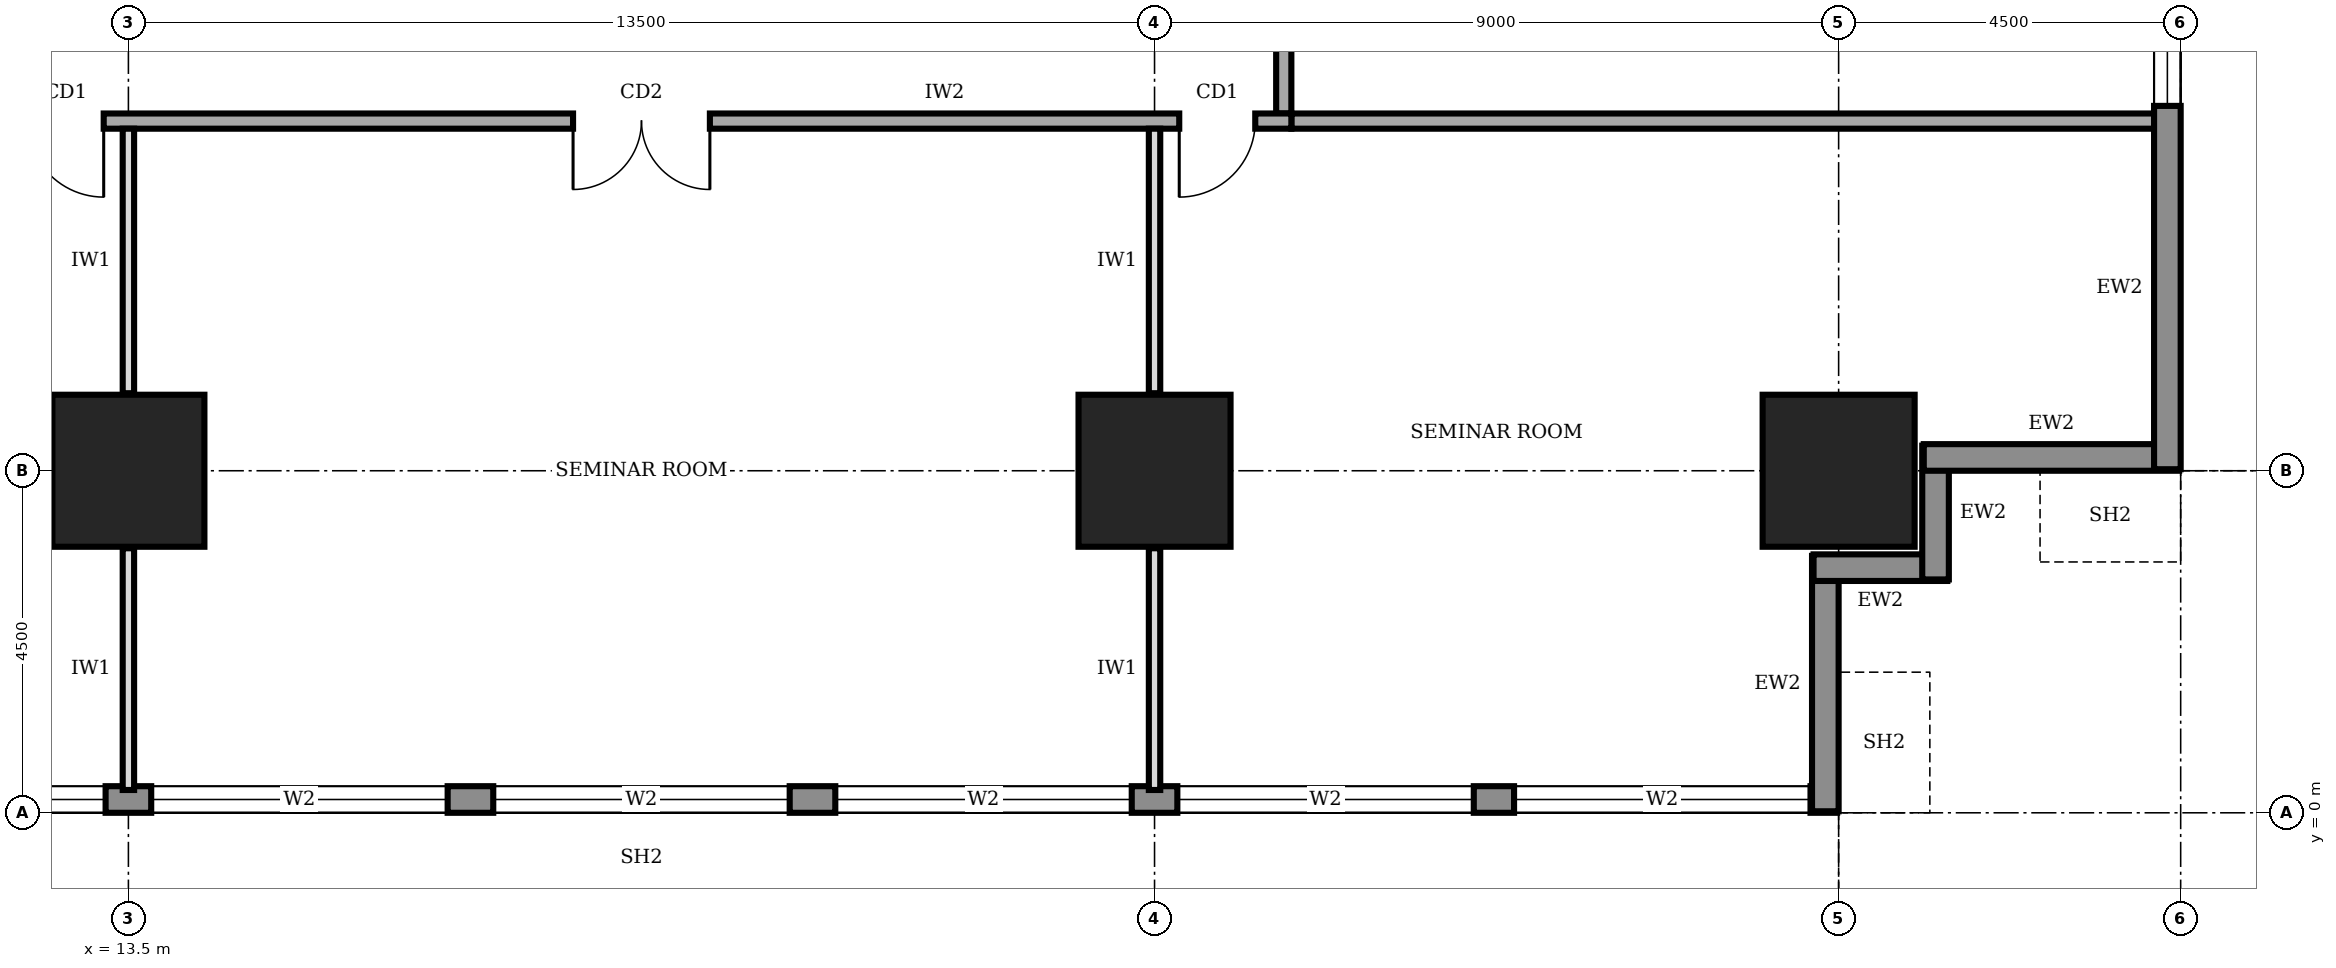
"""IFC4 building model, lengths in metres.
Left out: names, types, materials, properties, quantities, classifications, styles, units other than length and angle.
Written with IfcOpenShell. Run it as: python <this file> out.ifc"""

import sys

from ifc_helpers import new_model, si_unit, direction, frame, frame_2d, origin, origin_2d, place, context, subcontext, project, spatial, rectangle, extrude, element, fill, save


model = new_model("IFC4")
c1 = context("Model", 3, precision=1e-05, world=origin(), true_north=direction((0.0, 1.0)))
c2 = subcontext(c1, "Body", "Model", "MODEL_VIEW")
j1 = project(units=[si_unit("LENGTHUNIT", "METRE"), si_unit("PLANEANGLEUNIT", "RADIAN")], contexts=[c1])
p1 = place(None, origin())
s1 = spatial("IfcSite", under=j1, at=p1, CompositionType="ELEMENT")
p2 = place(p1, origin())
s2 = spatial("IfcBuilding", under=s1, at=p2, CompositionType="ELEMENT")
p3 = place(p2, frame((0.0, 0.0, 53.0)))
s3 = spatial("IfcBuildingStorey", under=s2, at=p3, CompositionType="ELEMENT", Elevation=53.0)
for number, where, z_axis, x_axis in (
    (1, (13.5, 4.5, 0.0), (0.0, 0.0, 1.0), (1.0, 0.0, 0.0)),
    (2, (27.0, 4.5, 0.0), (0.0, 0.0, 1.0), (1.0, 0.0, 0.0)),
    (3, (36.0, 4.5, 0.0), (0.0, 0.0, 1.0), (1.0, 0.0, 0.0)),
):
    element("IfcColumn", number, at=place(p3, frame(where, z_axis=z_axis, x_axis=x_axis)), inside=s3, PredefinedType="COLUMN", context=c2, shape_type="SweptSolid", body=[
        extrude(rectangle(XDim=2.0, YDim=2.0, at=origin_2d()), origin(), (0.0, 0.0, 1.0), 4.0),
    ])
p4 = place(p3, frame((4.52, 0.175, 0.0), z_axis=(0.0, 0.0, 1.0), x_axis=(1.0, 0.0, 0.0)))
e4 = element("IfcWall", 4, at=p4, inside=s3, PredefinedType="STANDARD", context=c2, shape_type="SweptSolid", body=[
    extrude(rectangle(XDim=31.46, YDim=0.35, at=frame_2d((15.73, 0.0))), origin(), (0.0, 0.0, 1.0), 3.75),
])
p5 = place(p4, frame((4.78, 0.0, 0.6)))
e5 = element("IfcOpeningElement", 5, at=p5, cuts=e4, PredefinedType="OPENING", context=c2, shape_type="SweptSolid", body=[
    extrude(rectangle(XDim=3.9, YDim=2.6, at=frame_2d((1.95, 1.3))), frame((0.0, 0.185, 0.0), z_axis=(0.0, -1.0, 0.0), x_axis=(1.0, 0.0, 0.0)), (0.0, 0.0, 1.0), 0.37),
])
p6 = place(p4, frame((9.28, 0.0, 0.6)))
e6 = element("IfcOpeningElement", 6, at=p6, cuts=e4, PredefinedType="OPENING", context=c2, shape_type="SweptSolid", body=[
    extrude(rectangle(XDim=3.9, YDim=2.6, at=frame_2d((1.95, 1.3))), frame((0.0, 0.185, 0.0), z_axis=(0.0, -1.0, 0.0), x_axis=(1.0, 0.0, 0.0)), (0.0, 0.0, 1.0), 0.37),
])
p7 = place(p4, frame((13.78, 0.0, 0.6)))
e7 = element("IfcOpeningElement", 7, at=p7, cuts=e4, PredefinedType="OPENING", context=c2, shape_type="SweptSolid", body=[
    extrude(rectangle(XDim=3.9, YDim=2.6, at=frame_2d((1.95, 1.3))), frame((0.0, 0.185, 0.0), z_axis=(0.0, -1.0, 0.0), x_axis=(1.0, 0.0, 0.0)), (0.0, 0.0, 1.0), 0.37),
])
p8 = place(p4, frame((18.28, 0.0, 0.6)))
e8 = element("IfcOpeningElement", 8, at=p8, cuts=e4, PredefinedType="OPENING", context=c2, shape_type="SweptSolid", body=[
    extrude(rectangle(XDim=3.9, YDim=2.6, at=frame_2d((1.95, 1.3))), frame((0.0, 0.185, 0.0), z_axis=(0.0, -1.0, 0.0), x_axis=(1.0, 0.0, 0.0)), (0.0, 0.0, 1.0), 0.37),
])
p9 = place(p4, frame((22.78, 0.0, 0.6)))
e9 = element("IfcOpeningElement", 9, at=p9, cuts=e4, PredefinedType="OPENING", context=c2, shape_type="SweptSolid", body=[
    extrude(rectangle(XDim=3.9, YDim=2.6, at=frame_2d((1.95, 1.3))), frame((0.0, 0.185, 0.0), z_axis=(0.0, -1.0, 0.0), x_axis=(1.0, 0.0, 0.0)), (0.0, 0.0, 1.0), 0.37),
])
p10 = place(p4, frame((27.21, 0.0, 0.6)))
e10 = element("IfcOpeningElement", 10, at=p10, cuts=e4, PredefinedType="OPENING", context=c2, shape_type="SweptSolid", body=[
    extrude(rectangle(XDim=3.9, YDim=2.6, at=frame_2d((1.95, 1.3))), frame((0.0, 0.185, 0.0), z_axis=(0.0, -1.0, 0.0), x_axis=(1.0, 0.0, 0.0)), (0.0, 0.0, 1.0), 0.37),
])
p11 = place(p3, frame((35.825, 0.02, 0.0), z_axis=(0.0, 0.0, 1.0), x_axis=(0.0, 1.0, 0.0)))
e11 = element("IfcWall", 11, at=p11, inside=s3, PredefinedType="STANDARD", context=c2, shape_type="SweptSolid", body=[
    extrude(rectangle(XDim=3.36, YDim=0.35, at=frame_2d((1.68, 0.0))), origin(), (0.0, 0.0, 1.0), 2.85),
])
for number, where, z_axis, x_axis in (
    (12, (35.67, 3.225, 0.0), (0.0, 0.0, 1.0), (1.0, 0.0, 0.0)),
    (13, (37.275, 3.07, 0.0), (0.0, 0.0, 1.0), (0.0, 1.0, 0.0)),
):
    element("IfcWall", number, at=place(p3, frame(where, z_axis=z_axis, x_axis=x_axis)), inside=s3, PredefinedType="STANDARD", context=c2, shape_type="SweptSolid", body=[
        extrude(rectangle(XDim=1.76, YDim=0.35, at=frame_2d((0.88, 0.0))), origin(), (0.0, 0.0, 1.0), 3.75),
    ])
p12 = place(p3, frame((37.12, 4.675, 0.0), z_axis=(0.0, 0.0, 1.0), x_axis=(1.0, 0.0, 0.0)))
e14 = element("IfcWall", 14, at=p12, inside=s3, PredefinedType="STANDARD", context=c2, shape_type="SweptSolid", body=[
    extrude(rectangle(XDim=3.36, YDim=0.35, at=frame_2d((1.68, 0.0))), origin(), (0.0, 0.0, 1.0), 2.85),
])
p13 = place(p3, frame((40.325, 4.52, 0.0), z_axis=(0.0, 0.0, 1.0), x_axis=(0.0, 1.0, 0.0)))
e15 = element("IfcWall", 15, at=p13, inside=s3, PredefinedType="STANDARD", context=c2, shape_type="SweptSolid", body=[
    extrude(rectangle(XDim=31.46, YDim=0.35, at=frame_2d((15.73, 0.0))), origin(), (0.0, 0.0, 1.0), 3.75),
])
p14 = place(p13, frame((4.78, 0.0, 0.6)))
e16 = element("IfcOpeningElement", 16, at=p14, cuts=e15, PredefinedType="OPENING", context=c2, shape_type="SweptSolid", body=[
    extrude(rectangle(XDim=3.9, YDim=2.6, at=frame_2d((1.95, 1.3))), frame((0.0, 0.185, 0.0), z_axis=(0.0, -1.0, 0.0), x_axis=(1.0, 0.0, 0.0)), (0.0, 0.0, 1.0), 0.37),
])
p15 = place(p13, frame((9.28, 0.0, 0.6)))
e17 = element("IfcOpeningElement", 17, at=p15, cuts=e15, PredefinedType="OPENING", context=c2, shape_type="SweptSolid", body=[
    extrude(rectangle(XDim=3.9, YDim=2.6, at=frame_2d((1.95, 1.3))), frame((0.0, 0.185, 0.0), z_axis=(0.0, -1.0, 0.0), x_axis=(1.0, 0.0, 0.0)), (0.0, 0.0, 1.0), 0.37),
])
p16 = place(p13, frame((13.78, 0.0, 0.6)))
e18 = element("IfcOpeningElement", 18, at=p16, cuts=e15, PredefinedType="OPENING", context=c2, shape_type="SweptSolid", body=[
    extrude(rectangle(XDim=3.9, YDim=2.6, at=frame_2d((1.95, 1.3))), frame((0.0, 0.185, 0.0), z_axis=(0.0, -1.0, 0.0), x_axis=(1.0, 0.0, 0.0)), (0.0, 0.0, 1.0), 0.37),
])
p17 = place(p13, frame((18.28, 0.0, 0.6)))
e19 = element("IfcOpeningElement", 19, at=p17, cuts=e15, PredefinedType="OPENING", context=c2, shape_type="SweptSolid", body=[
    extrude(rectangle(XDim=3.9, YDim=2.6, at=frame_2d((1.95, 1.3))), frame((0.0, 0.185, 0.0), z_axis=(0.0, -1.0, 0.0), x_axis=(1.0, 0.0, 0.0)), (0.0, 0.0, 1.0), 0.37),
])
p18 = place(p13, frame((22.78, 0.0, 0.6)))
e20 = element("IfcOpeningElement", 20, at=p18, cuts=e15, PredefinedType="OPENING", context=c2, shape_type="SweptSolid", body=[
    extrude(rectangle(XDim=3.9, YDim=2.6, at=frame_2d((1.95, 1.3))), frame((0.0, 0.185, 0.0), z_axis=(0.0, -1.0, 0.0), x_axis=(1.0, 0.0, 0.0)), (0.0, 0.0, 1.0), 0.37),
])
p19 = place(p13, frame((27.21, 0.0, 0.6)))
e21 = element("IfcOpeningElement", 21, at=p19, cuts=e15, PredefinedType="OPENING", context=c2, shape_type="SweptSolid", body=[
    extrude(rectangle(XDim=3.9, YDim=2.6, at=frame_2d((1.95, 1.3))), frame((0.0, 0.185, 0.0), z_axis=(0.0, -1.0, 0.0), x_axis=(1.0, 0.0, 0.0)), (0.0, 0.0, 1.0), 0.37),
])
p20 = place(p3, frame((11.9, 9.1, 0.0), z_axis=(0.0, 0.0, 1.0), x_axis=(1.0, 0.0, 0.0)))
e22 = element("IfcWall", 22, at=p20, inside=s3, PredefinedType="SOLIDWALL", context=c2, shape_type="SweptSolid", body=[
    extrude(rectangle(XDim=16.9, YDim=0.2, at=frame_2d((8.45, 0.0))), origin(), (0.0, 0.0, 1.0), 3.75),
])
p21 = place(p20, frame((0.275, 0.0, 0.0)))
e23 = element("IfcOpeningElement", 23, at=p21, cuts=e22, PredefinedType="OPENING", context=c2, shape_type="SweptSolid", body=[
    extrude(rectangle(XDim=1.0, YDim=2.1, at=frame_2d((0.5, 1.05))), frame((0.0, 0.11, 0.0), z_axis=(0.0, -1.0, 0.0), x_axis=(1.0, 0.0, 0.0)), (0.0, 0.0, 1.0), 0.22),
])
p22 = place(p20, frame((7.45, 0.0, 0.0)))
e24 = element("IfcOpeningElement", 24, at=p22, cuts=e22, PredefinedType="OPENING", context=c2, shape_type="SweptSolid", body=[
    extrude(rectangle(XDim=1.8, YDim=2.1, at=frame_2d((0.9, 1.05))), frame((0.0, 0.11, 0.0), z_axis=(0.0, -1.0, 0.0), x_axis=(1.0, 0.0, 0.0)), (0.0, 0.0, 1.0), 0.22),
])
p23 = place(p20, frame((15.425, 0.0, 0.0)))
e25 = element("IfcOpeningElement", 25, at=p23, cuts=e22, PredefinedType="OPENING", context=c2, shape_type="SweptSolid", body=[
    extrude(rectangle(XDim=1.0, YDim=2.1, at=frame_2d((0.5, 1.05))), frame((0.0, 0.11, 0.0), z_axis=(0.0, -1.0, 0.0), x_axis=(1.0, 0.0, 0.0)), (0.0, 0.0, 1.0), 0.22),
])
p24 = place(p3, frame((28.7, 9.2, 0.0), z_axis=(0.0, 0.0, 1.0), x_axis=(0.0, 1.0, 0.0)))
e26 = element("IfcWall", 26, at=p24, inside=s3, PredefinedType="SOLIDWALL", context=c2, shape_type="SweptSolid", body=[
    extrude(rectangle(XDim=23.8, YDim=0.2, at=frame_2d((11.9, 0.0))), origin(), (0.0, 0.0, 1.0), 3.75),
])
p25 = place(p24, frame((3.4, 0.0, 0.0)))
e27 = element("IfcOpeningElement", 27, at=p25, cuts=e26, PredefinedType="OPENING", context=c2, shape_type="SweptSolid", body=[
    extrude(rectangle(XDim=1.8, YDim=2.1, at=frame_2d((0.9, 1.05))), frame((0.0, 0.11, 0.0), z_axis=(0.0, -1.0, 0.0), x_axis=(1.0, 0.0, 0.0)), (0.0, 0.0, 1.0), 0.22),
])
p26 = place(p24, frame((10.55, 0.0, 0.0)))
e28 = element("IfcOpeningElement", 28, at=p26, cuts=e26, PredefinedType="OPENING", context=c2, shape_type="SweptSolid", body=[
    extrude(rectangle(XDim=1.0, YDim=2.1, at=frame_2d((0.5, 1.05))), frame((0.0, 0.11, 0.0), z_axis=(0.0, -1.0, 0.0), x_axis=(1.0, 0.0, 0.0)), (0.0, 0.0, 1.0), 0.22),
])
p27 = place(p24, frame((17.65, 0.0, 0.0)))
e29 = element("IfcOpeningElement", 29, at=p27, cuts=e26, PredefinedType="OPENING", context=c2, shape_type="SweptSolid", body=[
    extrude(rectangle(XDim=1.8, YDim=2.1, at=frame_2d((0.9, 1.05))), frame((0.0, 0.11, 0.0), z_axis=(0.0, -1.0, 0.0), x_axis=(1.0, 0.0, 0.0)), (0.0, 0.0, 1.0), 0.22),
])
p28 = place(p3, frame((28.8, 9.1, 0.0), z_axis=(0.0, 0.0, 1.0), x_axis=(1.0, 0.0, 0.0)))
e30 = element("IfcWall", 30, at=p28, inside=s3, PredefinedType="SOLIDWALL", context=c2, shape_type="SweptSolid", body=[
    extrude(rectangle(XDim=11.4, YDim=0.2, at=frame_2d((5.7, 0.0))), origin(), (0.0, 0.0, 1.0), 3.75),
])
p29 = place(p3, frame((13.5, 0.3, 0.0), z_axis=(0.0, 0.0, 1.0), x_axis=(0.0, 1.0, 0.0)))
e31 = element("IfcWall", 31, at=p29, inside=s3, PredefinedType="PARTITIONING", context=c2, shape_type="SweptSolid", body=[
    extrude(rectangle(XDim=3.18, YDim=0.15, at=frame_2d((1.59, 0.0))), origin(), (0.0, 0.0, 1.0), 2.85),
])
p30 = place(p3, frame((13.5, 5.52, 0.0), z_axis=(0.0, 0.0, 1.0), x_axis=(0.0, 1.0, 0.0)))
e32 = element("IfcWall", 32, at=p30, inside=s3, PredefinedType="PARTITIONING", context=c2, shape_type="SweptSolid", body=[
    extrude(rectangle(XDim=3.48, YDim=0.15, at=frame_2d((1.74, 0.0))), origin(), (0.0, 0.0, 1.0), 2.85),
])
p31 = place(p3, frame((27.0, 0.3, 0.0), z_axis=(0.0, 0.0, 1.0), x_axis=(0.0, 1.0, 0.0)))
e33 = element("IfcWall", 33, at=p31, inside=s3, PredefinedType="PARTITIONING", context=c2, shape_type="SweptSolid", body=[
    extrude(rectangle(XDim=3.18, YDim=0.15, at=frame_2d((1.59, 0.0))), origin(), (0.0, 0.0, 1.0), 2.85),
])
p32 = place(p3, frame((27.0, 5.52, 0.0), z_axis=(0.0, 0.0, 1.0), x_axis=(0.0, 1.0, 0.0)))
e34 = element("IfcWall", 34, at=p32, inside=s3, PredefinedType="PARTITIONING", context=c2, shape_type="SweptSolid", body=[
    extrude(rectangle(XDim=3.48, YDim=0.15, at=frame_2d((1.74, 0.0))), origin(), (0.0, 0.0, 1.0), 2.85),
])
p33 = place(p5, origin())
e35 = element("IfcWindow", 35, at=p33, inside=s3, PartitioningType="SINGLE_PANEL", PredefinedType="WINDOW", context=c2, shape_type="SweptSolid", body=[
    extrude(rectangle(XDim=3.9, YDim=2.6, at=frame_2d((1.95, 1.3))), frame((0.0, 0.03, 0.0), z_axis=(0.0, -1.0, 0.0), x_axis=(1.0, 0.0, 0.0)), (0.0, 0.0, 1.0), 0.06),
])
fill(e5, e35)
p34 = place(p6, origin())
e36 = element("IfcWindow", 36, at=p34, inside=s3, PartitioningType="SINGLE_PANEL", PredefinedType="WINDOW", context=c2, shape_type="SweptSolid", body=[
    extrude(rectangle(XDim=3.9, YDim=2.6, at=frame_2d((1.95, 1.3))), frame((0.0, 0.03, 0.0), z_axis=(0.0, -1.0, 0.0), x_axis=(1.0, 0.0, 0.0)), (0.0, 0.0, 1.0), 0.06),
])
fill(e6, e36)
p35 = place(p7, origin())
e37 = element("IfcWindow", 37, at=p35, inside=s3, PartitioningType="SINGLE_PANEL", PredefinedType="WINDOW", context=c2, shape_type="SweptSolid", body=[
    extrude(rectangle(XDim=3.9, YDim=2.6, at=frame_2d((1.95, 1.3))), frame((0.0, 0.03, 0.0), z_axis=(0.0, -1.0, 0.0), x_axis=(1.0, 0.0, 0.0)), (0.0, 0.0, 1.0), 0.06),
])
fill(e7, e37)
p36 = place(p8, origin())
e38 = element("IfcWindow", 38, at=p36, inside=s3, PartitioningType="SINGLE_PANEL", PredefinedType="WINDOW", context=c2, shape_type="SweptSolid", body=[
    extrude(rectangle(XDim=3.9, YDim=2.6, at=frame_2d((1.95, 1.3))), frame((0.0, 0.03, 0.0), z_axis=(0.0, -1.0, 0.0), x_axis=(1.0, 0.0, 0.0)), (0.0, 0.0, 1.0), 0.06),
])
fill(e8, e38)
p37 = place(p9, origin())
e39 = element("IfcWindow", 39, at=p37, inside=s3, PartitioningType="SINGLE_PANEL", PredefinedType="WINDOW", context=c2, shape_type="SweptSolid", body=[
    extrude(rectangle(XDim=3.9, YDim=2.6, at=frame_2d((1.95, 1.3))), frame((0.0, 0.03, 0.0), z_axis=(0.0, -1.0, 0.0), x_axis=(1.0, 0.0, 0.0)), (0.0, 0.0, 1.0), 0.06),
])
fill(e9, e39)
p38 = place(p10, origin())
e40 = element("IfcWindow", 40, at=p38, inside=s3, PartitioningType="SINGLE_PANEL", PredefinedType="WINDOW", context=c2, shape_type="SweptSolid", body=[
    extrude(rectangle(XDim=3.9, YDim=2.6, at=frame_2d((1.95, 1.3))), frame((0.0, 0.03, 0.0), z_axis=(0.0, -1.0, 0.0), x_axis=(1.0, 0.0, 0.0)), (0.0, 0.0, 1.0), 0.06),
])
fill(e10, e40)
p39 = place(p14, origin())
e41 = element("IfcWindow", 41, at=p39, inside=s3, PartitioningType="SINGLE_PANEL", PredefinedType="WINDOW", context=c2, shape_type="SweptSolid", body=[
    extrude(rectangle(XDim=3.9, YDim=2.6, at=frame_2d((1.95, 1.3))), frame((0.0, 0.03, 0.0), z_axis=(0.0, -1.0, 0.0), x_axis=(1.0, 0.0, 0.0)), (0.0, 0.0, 1.0), 0.06),
])
fill(e16, e41)
p40 = place(p21, frame((1.0, 0.0, 0.0), z_axis=(0.0, 0.0, 1.0), x_axis=(-1.0, 0.0, 0.0)))
e42 = element("IfcDoor", 42, at=p40, inside=s3, OperationType="SINGLE_SWING_LEFT", PredefinedType="DOOR", context=c2, shape_type="SweptSolid", body=[
    extrude(rectangle(XDim=1.0, YDim=2.1, at=frame_2d((0.5, 1.05))), frame((0.0, 0.025, 0.0), z_axis=(0.0, -1.0, 0.0), x_axis=(1.0, 0.0, 0.0)), (0.0, 0.0, 1.0), 0.05),
])
fill(e23, e42)
p41 = place(p22, frame((1.8, 0.0, 0.0), z_axis=(0.0, 0.0, 1.0), x_axis=(-1.0, 0.0, 0.0)))
e43 = element("IfcDoor", 43, at=p41, inside=s3, OperationType="DOUBLE_DOOR_SINGLE_SWING", PredefinedType="DOOR", context=c2, shape_type="SweptSolid", body=[
    extrude(rectangle(XDim=1.8, YDim=2.1, at=frame_2d((0.9, 1.05))), frame((0.0, 0.025, 0.0), z_axis=(0.0, -1.0, 0.0), x_axis=(1.0, 0.0, 0.0)), (0.0, 0.0, 1.0), 0.05),
])
fill(e24, e43)
p42 = place(p23, frame((1.0, 0.0, 0.0), z_axis=(0.0, 0.0, 1.0), x_axis=(-1.0, 0.0, 0.0)))
e44 = element("IfcDoor", 44, at=p42, inside=s3, OperationType="SINGLE_SWING_RIGHT", PredefinedType="DOOR", context=c2, shape_type="SweptSolid", body=[
    extrude(rectangle(XDim=1.0, YDim=2.1, at=frame_2d((0.5, 1.05))), frame((0.0, 0.025, 0.0), z_axis=(0.0, -1.0, 0.0), x_axis=(1.0, 0.0, 0.0)), (0.0, 0.0, 1.0), 0.05),
])
fill(e25, e44)
save(model, sys.argv[1])
